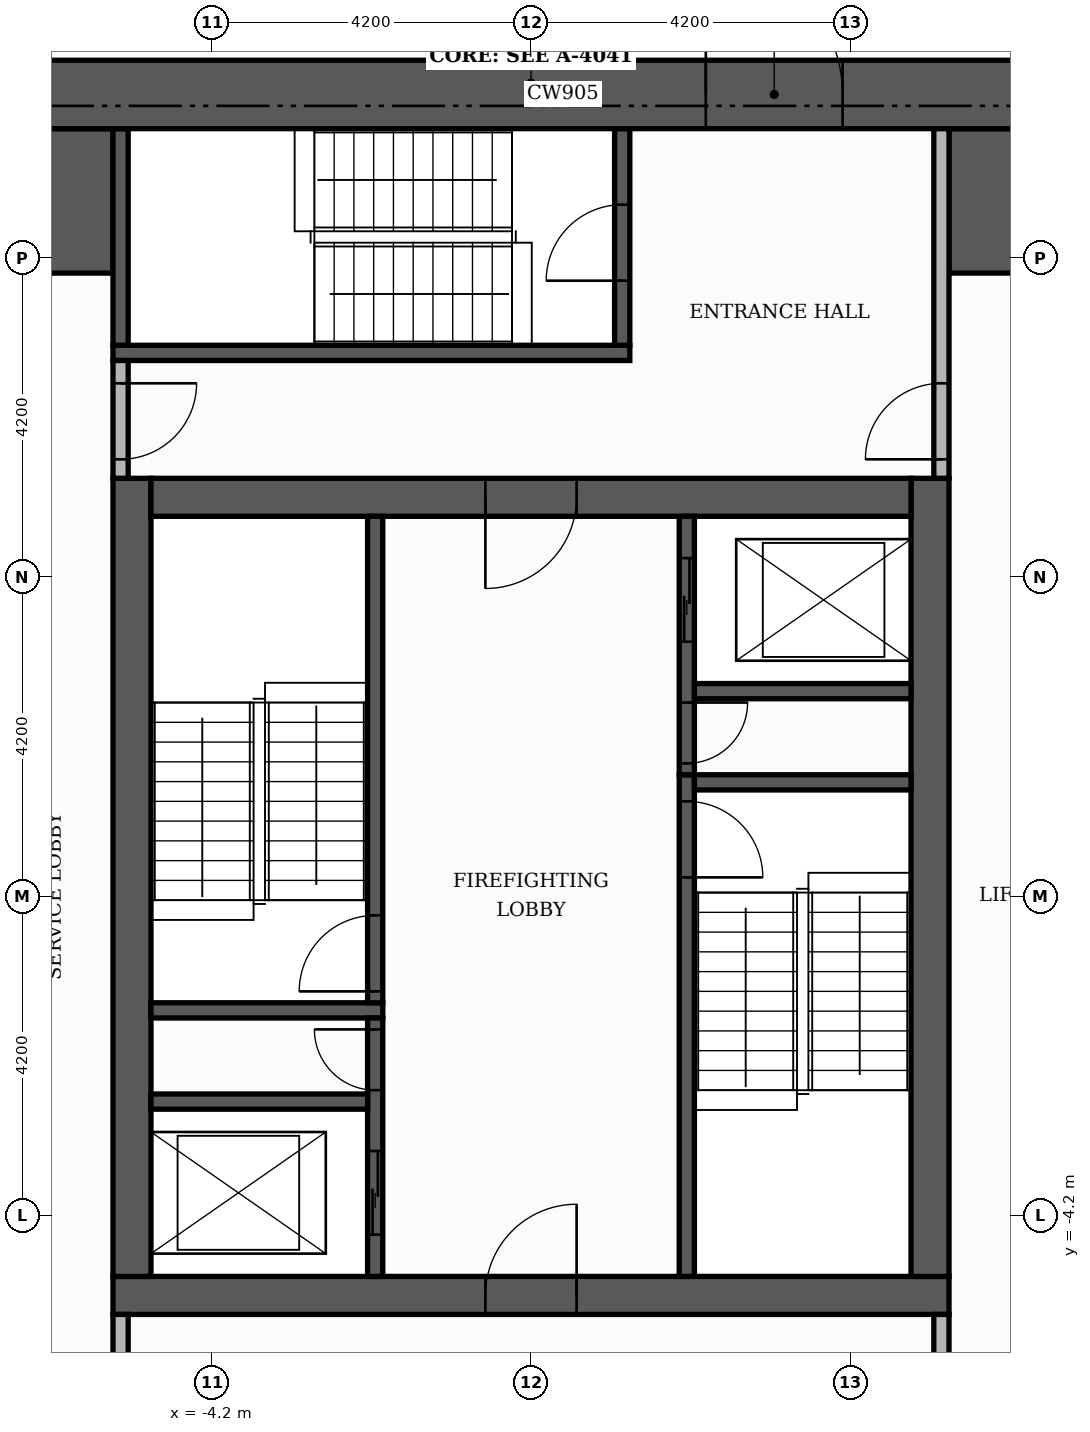
"""IFC4 building model, lengths in metres.
Left out: names, types, materials, properties, quantities, classifications, styles, units other than length and angle.
Written with IfcOpenShell. Run it as: python <this file> out.ifc"""

import sys

from ifc_helpers import new_model, si_unit, direction, frame, frame_2d, origin, place, context, subcontext, project, spatial, rectangle, extrude, element, fill, save


model = new_model("IFC4")
c1 = context("Model", 3, precision=1e-05, world=origin(), true_north=direction((0.0, 1.0)))
c2 = subcontext(c1, "Body", "Model", "MODEL_VIEW")
j1 = project(units=[si_unit("LENGTHUNIT", "METRE"), si_unit("PLANEANGLEUNIT", "RADIAN")], contexts=[c1])
p1 = place(None, origin())
s1 = spatial("IfcSite", under=j1, at=p1, CompositionType="ELEMENT")
p2 = place(p1, origin())
s2 = spatial("IfcBuilding", under=s1, at=p2, CompositionType="ELEMENT")
p3 = place(p2, frame((0.0, 0.0, 252.3)))
s3 = spatial("IfcBuildingStorey", under=s2, at=p3, CompositionType="ELEMENT", Elevation=252.3)
p4 = place(p3, frame((-5.5, -5.25, 0.0), z_axis=(0.0, 0.0, 1.0), x_axis=(1.0, 0.0, 0.0)))
e1 = element("IfcWall", 1, at=p4, inside=s3, PredefinedType="SHEAR", context=c2, shape_type="SweptSolid", body=[
    extrude(rectangle(XDim=11.0, YDim=0.5, at=frame_2d((5.5, 0.0))), origin(), (0.0, 0.0, 1.0), 3.48),
])
p5 = place(p4, frame((4.9, 0.0, 0.0)))
e2 = element("IfcOpeningElement", 2, at=p5, cuts=e1, PredefinedType="OPENING", context=c2, shape_type="SweptSolid", body=[
    extrude(rectangle(XDim=1.2, YDim=2.1, at=frame_2d((0.6, 1.05))), frame((0.0, 0.26, 0.0), z_axis=(0.0, -1.0, 0.0), x_axis=(1.0, 0.0, 0.0)), (0.0, 0.0, 1.0), 0.52),
])
for number, where, z_axis, x_axis in (
    (3, (-5.25, -5.0, 0.0), (0.0, 0.0, 1.0), (0.0, 1.0, 0.0)),
    (4, (5.25, -5.0, 0.0), (0.0, 0.0, 1.0), (0.0, 1.0, 0.0)),
):
    element("IfcWall", number, at=place(p3, frame(where, z_axis=z_axis, x_axis=x_axis)), inside=s3, PredefinedType="SHEAR", context=c2, shape_type="SweptSolid", body=[
        extrude(rectangle(XDim=10.5, YDim=0.5, at=frame_2d((5.25, 0.0))), origin(), (0.0, 0.0, 1.0), 3.48),
    ])
p6 = place(p3, frame((-5.0, 5.25, 0.0), z_axis=(0.0, 0.0, 1.0), x_axis=(1.0, 0.0, 0.0)))
e5 = element("IfcWall", 5, at=p6, inside=s3, PredefinedType="SHEAR", context=c2, shape_type="SweptSolid", body=[
    extrude(rectangle(XDim=10.0, YDim=0.5, at=frame_2d((5.0, 0.0))), origin(), (0.0, 0.0, 1.0), 3.48),
])
p7 = place(p6, frame((4.4, 0.0, 0.0)))
e6 = element("IfcOpeningElement", 6, at=p7, cuts=e5, PredefinedType="OPENING", context=c2, shape_type="SweptSolid", body=[
    extrude(rectangle(XDim=1.2, YDim=2.1, at=frame_2d((0.6, 1.05))), frame((0.0, 0.26, 0.0), z_axis=(0.0, -1.0, 0.0), x_axis=(1.0, 0.0, 0.0)), (0.0, 0.0, 1.0), 0.52),
])
for number, where, z_axis, x_axis in (
    (7, (-10.1, 9.15, 0.0), (0.0, 0.0, 1.0), (1.0, 0.0, 0.0)),
    (8, (5.5, 9.15, 0.0), (0.0, 0.0, 1.0), (1.0, 0.0, 0.0)),
):
    element("IfcWall", number, at=place(p3, frame(where, z_axis=z_axis, x_axis=x_axis)), inside=s3, PredefinedType="SHEAR", context=c2, shape_type="SweptSolid", body=[
        extrude(rectangle(XDim=4.6, YDim=1.9, at=frame_2d((2.3, 0.0))), origin(), (0.0, 0.0, 1.0), 3.48),
    ])
p8 = place(p3, frame((2.05, -5.0, 0.0), z_axis=(0.0, 0.0, 1.0), x_axis=(0.0, 1.0, 0.0)))
e9 = element("IfcWall", 9, at=p8, inside=s3, PredefinedType="SHEAR", context=c2, shape_type="SweptSolid", body=[
    extrude(rectangle(XDim=6.6, YDim=0.2, at=frame_2d((3.3, 0.0))), origin(), (0.0, 0.0, 1.0), 3.48),
])
p9 = place(p8, frame((5.25, 0.0, 0.0)))
e10 = element("IfcOpeningElement", 10, at=p9, cuts=e9, PredefinedType="OPENING", context=c2, shape_type="SweptSolid", body=[
    extrude(rectangle(XDim=1.0, YDim=2.1, at=frame_2d((0.5, 1.05))), frame((0.0, 0.11, 0.0), z_axis=(0.0, -1.0, 0.0), x_axis=(1.0, 0.0, 0.0)), (0.0, 0.0, 1.0), 0.22),
])
p10 = place(p3, frame((-5.0, -1.5, 0.0), z_axis=(0.0, 0.0, 1.0), x_axis=(1.0, 0.0, 0.0)))
e11 = element("IfcWall", 11, at=p10, inside=s3, PredefinedType="SHEAR", context=c2, shape_type="SweptSolid", body=[
    extrude(rectangle(XDim=3.05, YDim=0.2, at=frame_2d((1.525, 0.0))), origin(), (0.0, 0.0, 1.0), 3.48),
])
p11 = place(p3, frame((-2.05, -1.4, 0.0), z_axis=(0.0, 0.0, 1.0), x_axis=(0.0, 1.0, 0.0)))
e12 = element("IfcWall", 12, at=p11, inside=s3, PredefinedType="SHEAR", context=c2, shape_type="SweptSolid", body=[
    extrude(rectangle(XDim=6.4, YDim=0.2, at=frame_2d((3.2, 0.0))), origin(), (0.0, 0.0, 1.0), 3.48),
])
p12 = place(p11, frame((0.15, 0.0, 0.0)))
e13 = element("IfcOpeningElement", 13, at=p12, cuts=e12, PredefinedType="OPENING", context=c2, shape_type="SweptSolid", body=[
    extrude(rectangle(XDim=1.0, YDim=2.1, at=frame_2d((0.5, 1.05))), frame((0.0, 0.11, 0.0), z_axis=(0.0, -1.0, 0.0), x_axis=(1.0, 0.0, 0.0)), (0.0, 0.0, 1.0), 0.22),
])
p13 = place(p3, frame((2.15, 1.5, 0.0), z_axis=(0.0, 0.0, 1.0), x_axis=(1.0, 0.0, 0.0)))
e14 = element("IfcWall", 14, at=p13, inside=s3, PredefinedType="SHEAR", context=c2, shape_type="SweptSolid", body=[
    extrude(rectangle(XDim=2.85, YDim=0.2, at=frame_2d((1.425, 0.0))), origin(), (0.0, 0.0, 1.0), 3.48),
])
p14 = place(p3, frame((-5.5, 7.15, 0.0), z_axis=(0.0, 0.0, 1.0), x_axis=(1.0, 0.0, 0.0)))
e15 = element("IfcWall", 15, at=p14, inside=s3, PredefinedType="SHEAR", context=c2, shape_type="SweptSolid", body=[
    extrude(rectangle(XDim=6.8, YDim=0.2, at=frame_2d((3.4, 0.0))), origin(), (0.0, 0.0, 1.0), 3.48),
])
p15 = place(p3, frame((-5.4, 7.25, 0.0), z_axis=(0.0, 0.0, 1.0), x_axis=(0.0, 1.0, 0.0)))
e16 = element("IfcWall", 16, at=p15, inside=s3, PredefinedType="SHEAR", context=c2, shape_type="SweptSolid", body=[
    extrude(rectangle(XDim=2.85, YDim=0.2, at=frame_2d((1.425, 0.0))), origin(), (0.0, 0.0, 1.0), 3.48),
])
p16 = place(p3, frame((1.2, 7.25, 0.0), z_axis=(0.0, 0.0, 1.0), x_axis=(0.0, 1.0, 0.0)))
e17 = element("IfcWall", 17, at=p16, inside=s3, PredefinedType="SHEAR", context=c2, shape_type="SweptSolid", body=[
    extrude(rectangle(XDim=2.85, YDim=0.2, at=frame_2d((1.425, 0.0))), origin(), (0.0, 0.0, 1.0), 3.48),
])
p17 = place(p16, frame((0.85, 0.0, 0.0)))
e18 = element("IfcOpeningElement", 18, at=p17, cuts=e17, PredefinedType="OPENING", context=c2, shape_type="SweptSolid", body=[
    extrude(rectangle(XDim=1.0, YDim=2.1, at=frame_2d((0.5, 1.05))), frame((0.0, 0.11, 0.0), z_axis=(0.0, -1.0, 0.0), x_axis=(1.0, 0.0, 0.0)), (0.0, 0.0, 1.0), 0.22),
])
p18 = place(p3, frame((-2.05, -5.0, 0.0), z_axis=(0.0, 0.0, 1.0), x_axis=(0.0, 1.0, 0.0)))
e19 = element("IfcWall", 19, at=p18, inside=s3, PredefinedType="SHEAR", context=c2, shape_type="SweptSolid", body=[
    extrude(rectangle(XDim=3.4, YDim=0.2, at=frame_2d((1.7, 0.0))), origin(), (0.0, 0.0, 1.0), 3.48),
])
p19 = place(p18, frame((0.55, 0.0, 0.0)))
e20 = element("IfcOpeningElement", 20, at=p19, cuts=e19, PredefinedType="OPENING", context=c2, shape_type="SweptSolid", body=[
    extrude(rectangle(XDim=1.1, YDim=2.1, at=frame_2d((0.55, 1.05))), frame((0.0, 0.11, 0.0), z_axis=(0.0, -1.0, 0.0), x_axis=(1.0, 0.0, 0.0)), (0.0, 0.0, 1.0), 0.22),
])
p20 = place(p18, frame((2.45, 0.0, 0.0)))
e21 = element("IfcOpeningElement", 21, at=p20, cuts=e19, PredefinedType="OPENING", context=c2, shape_type="SweptSolid", body=[
    extrude(rectangle(XDim=0.8, YDim=2.1, at=frame_2d((0.4, 1.05))), frame((0.0, 0.11, 0.0), z_axis=(0.0, -1.0, 0.0), x_axis=(1.0, 0.0, 0.0)), (0.0, 0.0, 1.0), 0.22),
])
p21 = place(p3, frame((-5.0, -2.7, 0.0), z_axis=(0.0, 0.0, 1.0), x_axis=(1.0, 0.0, 0.0)))
e22 = element("IfcWall", 22, at=p21, inside=s3, PredefinedType="SHEAR", context=c2, shape_type="SweptSolid", body=[
    extrude(rectangle(XDim=2.85, YDim=0.2, at=frame_2d((1.425, 0.0))), origin(), (0.0, 0.0, 1.0), 3.48),
])
p22 = place(p3, frame((2.05, 1.6, 0.0), z_axis=(0.0, 0.0, 1.0), x_axis=(0.0, 1.0, 0.0)))
e23 = element("IfcWall", 23, at=p22, inside=s3, PredefinedType="SHEAR", context=c2, shape_type="SweptSolid", body=[
    extrude(rectangle(XDim=3.4, YDim=0.2, at=frame_2d((1.7, 0.0))), origin(), (0.0, 0.0, 1.0), 3.48),
])
p23 = place(p22, frame((1.75, 0.0, 0.0)))
e24 = element("IfcOpeningElement", 24, at=p23, cuts=e23, PredefinedType="OPENING", context=c2, shape_type="SweptSolid", body=[
    extrude(rectangle(XDim=1.1, YDim=2.1, at=frame_2d((0.55, 1.05))), frame((0.0, 0.11, 0.0), z_axis=(0.0, -1.0, 0.0), x_axis=(1.0, 0.0, 0.0)), (0.0, 0.0, 1.0), 0.22),
])
p24 = place(p22, frame((0.15, 0.0, 0.0)))
e25 = element("IfcOpeningElement", 25, at=p24, cuts=e23, PredefinedType="OPENING", context=c2, shape_type="SweptSolid", body=[
    extrude(rectangle(XDim=0.8, YDim=2.1, at=frame_2d((0.4, 1.05))), frame((0.0, 0.11, 0.0), z_axis=(0.0, -1.0, 0.0), x_axis=(1.0, 0.0, 0.0)), (0.0, 0.0, 1.0), 0.22),
])
p25 = place(p3, frame((2.15, 2.7, 0.0), z_axis=(0.0, 0.0, 1.0), x_axis=(1.0, 0.0, 0.0)))
e26 = element("IfcWall", 26, at=p25, inside=s3, PredefinedType="SHEAR", context=c2, shape_type="SweptSolid", body=[
    extrude(rectangle(XDim=2.85, YDim=0.2, at=frame_2d((1.425, 0.0))), origin(), (0.0, 0.0, 1.0), 3.48),
])
p26 = place(p3, frame((-11.0, 10.55, 0.0), z_axis=(0.0, 0.0, 1.0), x_axis=(1.0, 0.0, 0.0)))
e27 = element("IfcWall", 27, at=p26, inside=s3, PredefinedType="SHEAR", context=c2, shape_type="SweptSolid", body=[
    extrude(rectangle(XDim=22.0, YDim=0.9, at=frame_2d((11.0, 0.0))), origin(), (0.0, 0.0, 1.0), 3.48),
])
p27 = place(p26, frame((13.3, 0.0, 0.0)))
e28 = element("IfcOpeningElement", 28, at=p27, cuts=e27, PredefinedType="OPENING", context=c2, shape_type="SweptSolid", body=[
    extrude(rectangle(XDim=1.8, YDim=2.2, at=frame_2d((0.9, 1.1))), frame((0.0, 0.46, 0.0), z_axis=(0.0, -1.0, 0.0), x_axis=(1.0, 0.0, 0.0)), (0.0, 0.0, 1.0), 0.92),
])
p28 = place(p3, frame((-5.4, -10.1, 0.0), z_axis=(0.0, 0.0, 1.0), x_axis=(0.0, 1.0, 0.0)))
e29 = element("IfcWall", 29, at=p28, inside=s3, PredefinedType="PARTITIONING", context=c2, shape_type="SweptSolid", body=[
    extrude(rectangle(XDim=4.6, YDim=0.2, at=frame_2d((2.3, 0.0))), origin(), (0.0, 0.0, 1.0), 3.48),
])
p29 = place(p28, frame((2.9, 0.0, 0.0)))
e30 = element("IfcOpeningElement", 30, at=p29, cuts=e29, PredefinedType="OPENING", context=c2, shape_type="SweptSolid", body=[
    extrude(rectangle(XDim=1.0, YDim=2.1, at=frame_2d((0.5, 1.05))), frame((0.0, 0.11, 0.0), z_axis=(0.0, -1.0, 0.0), x_axis=(1.0, 0.0, 0.0)), (0.0, 0.0, 1.0), 0.22),
])
p30 = place(p3, frame((5.4, -10.1, 0.0), z_axis=(0.0, 0.0, 1.0), x_axis=(0.0, 1.0, 0.0)))
e31 = element("IfcWall", 31, at=p30, inside=s3, PredefinedType="PARTITIONING", context=c2, shape_type="SweptSolid", body=[
    extrude(rectangle(XDim=4.6, YDim=0.2, at=frame_2d((2.3, 0.0))), origin(), (0.0, 0.0, 1.0), 3.48),
])
p31 = place(p30, frame((2.9, 0.0, 0.0)))
e32 = element("IfcOpeningElement", 32, at=p31, cuts=e31, PredefinedType="OPENING", context=c2, shape_type="SweptSolid", body=[
    extrude(rectangle(XDim=1.0, YDim=2.1, at=frame_2d((0.5, 1.05))), frame((0.0, 0.11, 0.0), z_axis=(0.0, -1.0, 0.0), x_axis=(1.0, 0.0, 0.0)), (0.0, 0.0, 1.0), 0.22),
])
p32 = place(p3, frame((-5.4, 5.5, 0.0), z_axis=(0.0, 0.0, 1.0), x_axis=(0.0, 1.0, 0.0)))
e33 = element("IfcWall", 33, at=p32, inside=s3, PredefinedType="PARTITIONING", context=c2, shape_type="SweptSolid", body=[
    extrude(rectangle(XDim=1.55, YDim=0.2, at=frame_2d((0.775, 0.0))), origin(), (0.0, 0.0, 1.0), 3.48),
])
p33 = place(p32, frame((0.25, 0.0, 0.0)))
e34 = element("IfcOpeningElement", 34, at=p33, cuts=e33, PredefinedType="OPENING", context=c2, shape_type="SweptSolid", body=[
    extrude(rectangle(XDim=1.0, YDim=2.1, at=frame_2d((0.5, 1.05))), frame((0.0, 0.11, 0.0), z_axis=(0.0, -1.0, 0.0), x_axis=(1.0, 0.0, 0.0)), (0.0, 0.0, 1.0), 0.22),
])
p34 = place(p3, frame((5.4, 5.5, 0.0), z_axis=(0.0, 0.0, 1.0), x_axis=(0.0, 1.0, 0.0)))
e35 = element("IfcWall", 35, at=p34, inside=s3, PredefinedType="PARTITIONING", context=c2, shape_type="SweptSolid", body=[
    extrude(rectangle(XDim=4.6, YDim=0.2, at=frame_2d((2.3, 0.0))), origin(), (0.0, 0.0, 1.0), 3.48),
])
p35 = place(p34, frame((0.25, 0.0, 0.0)))
e36 = element("IfcOpeningElement", 36, at=p35, cuts=e35, PredefinedType="OPENING", context=c2, shape_type="SweptSolid", body=[
    extrude(rectangle(XDim=1.0, YDim=2.1, at=frame_2d((0.5, 1.05))), frame((0.0, 0.11, 0.0), z_axis=(0.0, -1.0, 0.0), x_axis=(1.0, 0.0, 0.0)), (0.0, 0.0, 1.0), 0.22),
])
p36 = place(p23, origin())
e37 = element("IfcDoor", 37, at=p36, inside=s3, OperationType="SLIDING_TO_LEFT", PredefinedType="DOOR", context=c2, shape_type="SweptSolid", body=[
    extrude(rectangle(XDim=1.1, YDim=2.1, at=frame_2d((0.55, 1.05))), frame((0.0, 0.025, 0.0), z_axis=(0.0, -1.0, 0.0), x_axis=(1.0, 0.0, 0.0)), (0.0, 0.0, 1.0), 0.05),
])
fill(e24, e37)
p37 = place(p19, origin())
e38 = element("IfcDoor", 38, at=p37, inside=s3, OperationType="SLIDING_TO_LEFT", PredefinedType="DOOR", context=c2, shape_type="SweptSolid", body=[
    extrude(rectangle(XDim=1.1, YDim=2.1, at=frame_2d((0.55, 1.05))), frame((0.0, 0.025, 0.0), z_axis=(0.0, -1.0, 0.0), x_axis=(1.0, 0.0, 0.0)), (0.0, 0.0, 1.0), 0.05),
])
fill(e20, e38)
p38 = place(p12, origin())
e39 = element("IfcDoor", 39, at=p38, inside=s3, OperationType="SINGLE_SWING_LEFT", PredefinedType="DOOR", context=c2, shape_type="SweptSolid", body=[
    extrude(rectangle(XDim=1.0, YDim=2.1, at=frame_2d((0.5, 1.05))), frame((0.0, 0.025, 0.0), z_axis=(0.0, -1.0, 0.0), x_axis=(1.0, 0.0, 0.0)), (0.0, 0.0, 1.0), 0.05),
])
fill(e13, e39)
p39 = place(p9, frame((1.0, 0.0, 0.0), z_axis=(0.0, 0.0, 1.0), x_axis=(-1.0, 0.0, 0.0)))
e40 = element("IfcDoor", 40, at=p39, inside=s3, OperationType="SINGLE_SWING_LEFT", PredefinedType="DOOR", context=c2, shape_type="SweptSolid", body=[
    extrude(rectangle(XDim=1.0, YDim=2.1, at=frame_2d((0.5, 1.05))), frame((0.0, 0.025, 0.0), z_axis=(0.0, -1.0, 0.0), x_axis=(1.0, 0.0, 0.0)), (0.0, 0.0, 1.0), 0.05),
])
fill(e10, e40)
p40 = place(p24, frame((0.8, 0.0, 0.0), z_axis=(0.0, 0.0, 1.0), x_axis=(-1.0, 0.0, 0.0)))
e41 = element("IfcDoor", 41, at=p40, inside=s3, OperationType="SINGLE_SWING_RIGHT", PredefinedType="DOOR", context=c2, shape_type="SweptSolid", body=[
    extrude(rectangle(XDim=0.8, YDim=2.1, at=frame_2d((0.4, 1.05))), frame((0.0, 0.025, 0.0), z_axis=(0.0, -1.0, 0.0), x_axis=(1.0, 0.0, 0.0)), (0.0, 0.0, 1.0), 0.05),
])
fill(e25, e41)
p41 = place(p20, origin())
e42 = element("IfcDoor", 42, at=p41, inside=s3, OperationType="SINGLE_SWING_RIGHT", PredefinedType="DOOR", context=c2, shape_type="SweptSolid", body=[
    extrude(rectangle(XDim=0.8, YDim=2.1, at=frame_2d((0.4, 1.05))), frame((0.0, 0.025, 0.0), z_axis=(0.0, -1.0, 0.0), x_axis=(1.0, 0.0, 0.0)), (0.0, 0.0, 1.0), 0.05),
])
fill(e21, e42)
p42 = place(p7, frame((1.2, 0.0, 0.0), z_axis=(0.0, 0.0, 1.0), x_axis=(-1.0, 0.0, 0.0)))
e43 = element("IfcDoor", 43, at=p42, inside=s3, OperationType="SINGLE_SWING_LEFT", PredefinedType="DOOR", context=c2, shape_type="SweptSolid", body=[
    extrude(rectangle(XDim=1.2, YDim=2.1, at=frame_2d((0.6, 1.05))), frame((0.0, 0.025, 0.0), z_axis=(0.0, -1.0, 0.0), x_axis=(1.0, 0.0, 0.0)), (0.0, 0.0, 1.0), 0.05),
])
fill(e6, e43)
p43 = place(p5, origin())
e44 = element("IfcDoor", 44, at=p43, inside=s3, OperationType="SINGLE_SWING_RIGHT", PredefinedType="DOOR", context=c2, shape_type="SweptSolid", body=[
    extrude(rectangle(XDim=1.2, YDim=2.1, at=frame_2d((0.6, 1.05))), frame((0.0, 0.025, 0.0), z_axis=(0.0, -1.0, 0.0), x_axis=(1.0, 0.0, 0.0)), (0.0, 0.0, 1.0), 0.05),
])
fill(e2, e44)
p44 = place(p17, origin())
e45 = element("IfcDoor", 45, at=p44, inside=s3, OperationType="SINGLE_SWING_LEFT", PredefinedType="DOOR", context=c2, shape_type="SweptSolid", body=[
    extrude(rectangle(XDim=1.0, YDim=2.1, at=frame_2d((0.5, 1.05))), frame((0.0, 0.025, 0.0), z_axis=(0.0, -1.0, 0.0), x_axis=(1.0, 0.0, 0.0)), (0.0, 0.0, 1.0), 0.05),
])
fill(e18, e45)
p45 = place(p33, frame((1.0, 0.0, 0.0), z_axis=(0.0, 0.0, 1.0), x_axis=(-1.0, 0.0, 0.0)))
e46 = element("IfcDoor", 46, at=p45, inside=s3, OperationType="SINGLE_SWING_RIGHT", PredefinedType="DOOR", context=c2, shape_type="SweptSolid", body=[
    extrude(rectangle(XDim=1.0, YDim=2.1, at=frame_2d((0.5, 1.05))), frame((0.0, 0.025, 0.0), z_axis=(0.0, -1.0, 0.0), x_axis=(1.0, 0.0, 0.0)), (0.0, 0.0, 1.0), 0.05),
])
fill(e34, e46)
p46 = place(p35, origin())
e47 = element("IfcDoor", 47, at=p46, inside=s3, OperationType="SINGLE_SWING_LEFT", PredefinedType="DOOR", context=c2, shape_type="SweptSolid", body=[
    extrude(rectangle(XDim=1.0, YDim=2.1, at=frame_2d((0.5, 1.05))), frame((0.0, 0.025, 0.0), z_axis=(0.0, -1.0, 0.0), x_axis=(1.0, 0.0, 0.0)), (0.0, 0.0, 1.0), 0.05),
])
fill(e36, e47)
p47 = place(p27, origin())
e48 = element("IfcDoor", 48, at=p47, inside=s3, OperationType="DOUBLE_DOOR_SINGLE_SWING", PredefinedType="DOOR", context=c2, shape_type="SweptSolid", body=[
    extrude(rectangle(XDim=1.8, YDim=2.2, at=frame_2d((0.9, 1.1))), frame((0.0, 0.025, 0.0), z_axis=(0.0, -1.0, 0.0), x_axis=(1.0, 0.0, 0.0)), (0.0, 0.0, 1.0), 0.05),
])
fill(e28, e48)
save(model, sys.argv[1])
